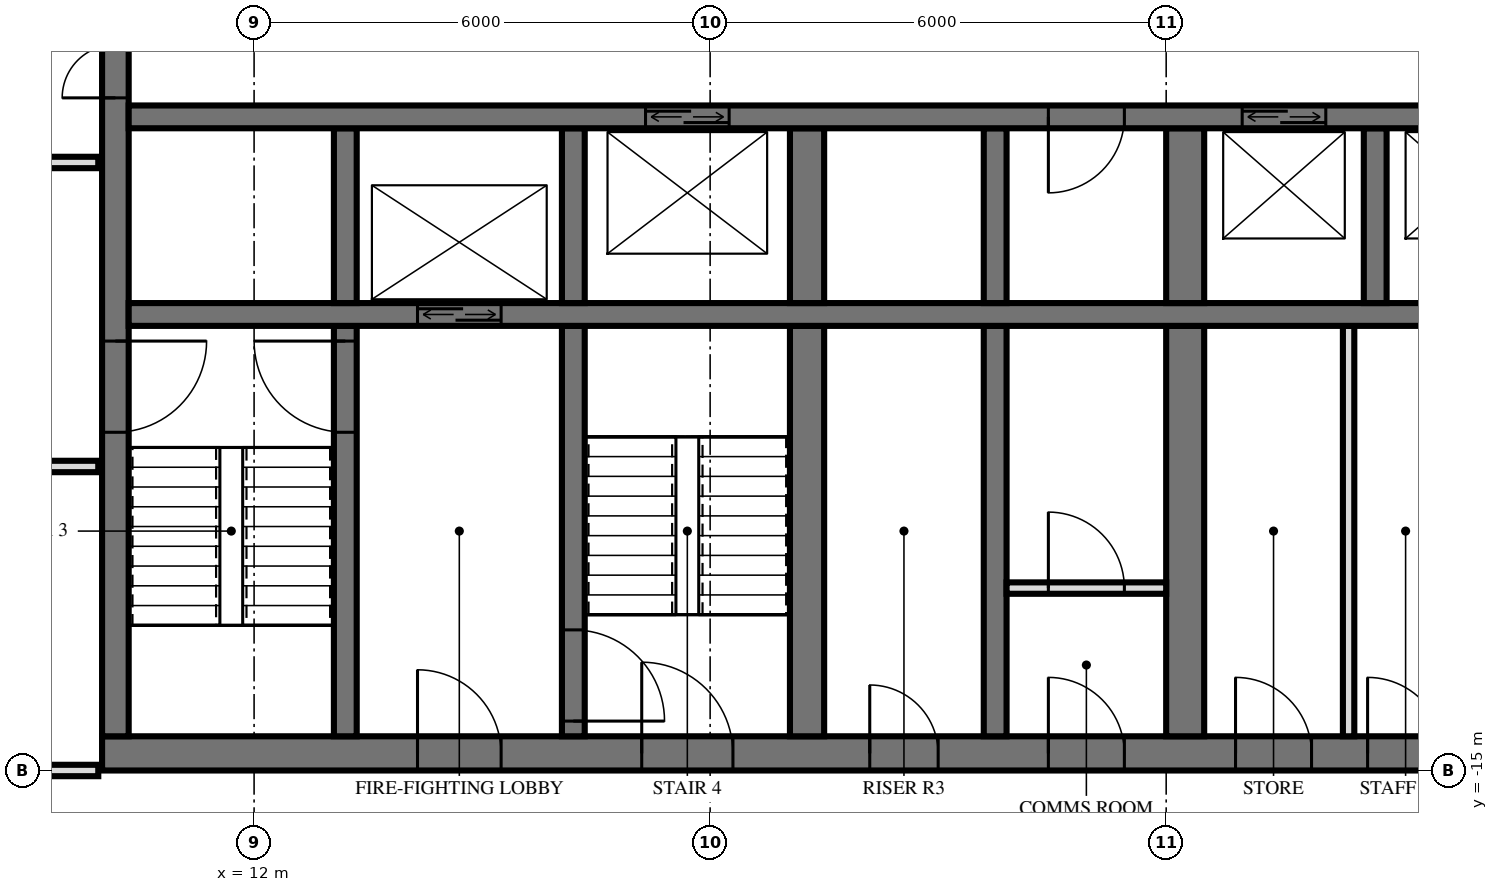
"""IFC4 building model, lengths in metres.
Left out: names, types, materials, properties, quantities, classifications, styles, units other than length and angle.
Written with IfcOpenShell. Run it as: python <this file> out.ifc"""

import sys

from ifc_helpers import new_model, si_unit, direction, frame, frame_2d, origin, place, context, subcontext, project, spatial, rectangle, extrude, element, fill, save


model = new_model("IFC4")
c1 = context("Model", 3, precision=1e-05, world=origin(), true_north=direction((0.0, 1.0)))
c2 = subcontext(c1, "Body", "Model", "MODEL_VIEW")
j1 = project(units=[si_unit("LENGTHUNIT", "METRE"), si_unit("PLANEANGLEUNIT", "RADIAN")], contexts=[c1])
p1 = place(None, origin())
s1 = spatial("IfcSite", under=j1, at=p1, CompositionType="ELEMENT")
p2 = place(p1, origin())
s2 = spatial("IfcBuilding", under=s1, at=p2, CompositionType="ELEMENT")
p3 = place(p2, frame((0.0, 0.0, 92.4)))
s3 = spatial("IfcBuildingStorey", under=s2, at=p3, CompositionType="ELEMENT", Elevation=92.4)
p4 = place(p3, frame((10.0, -14.775, 0.0), z_axis=(0.0, 0.0, 1.0), x_axis=(1.0, 0.0, 0.0)))
e1 = element("IfcWall", 1, at=p4, inside=s3, PredefinedType="SHEAR", context=c2, shape_type="SweptSolid", body=[
    extrude(rectangle(XDim=19.5, YDim=0.45, at=frame_2d((9.75, 0.0))), origin(), (0.0, 0.0, 1.0), 3.6),
])
p5 = place(p4, frame((7.1, 0.0, 0.0)))
e2 = element("IfcOpeningElement", 2, at=p5, cuts=e1, PredefinedType="OPENING", context=c2, shape_type="SweptSolid", body=[
    extrude(rectangle(XDim=1.2, YDim=2.1, at=frame_2d((0.6, 1.05))), frame((0.0, 0.235, 0.0), z_axis=(0.0, -1.0, 0.0), x_axis=(1.0, 0.0, 0.0)), (0.0, 0.0, 1.0), 0.47),
])
p6 = place(p4, frame((4.15, 0.0, 0.0)))
e3 = element("IfcOpeningElement", 3, at=p6, cuts=e1, PredefinedType="OPENING", context=c2, shape_type="SweptSolid", body=[
    extrude(rectangle(XDim=1.1, YDim=2.1, at=frame_2d((0.55, 1.05))), frame((0.0, 0.235, 0.0), z_axis=(0.0, -1.0, 0.0), x_axis=(1.0, 0.0, 0.0)), (0.0, 0.0, 1.0), 0.47),
])
p7 = place(p4, frame((10.1, 0.0, 0.0)))
e4 = element("IfcOpeningElement", 4, at=p7, cuts=e1, PredefinedType="OPENING", context=c2, shape_type="SweptSolid", body=[
    extrude(rectangle(XDim=0.9, YDim=2.1, at=frame_2d((0.45, 1.05))), frame((0.0, 0.235, 0.0), z_axis=(0.0, -1.0, 0.0), x_axis=(1.0, 0.0, 0.0)), (0.0, 0.0, 1.0), 0.47),
])
p8 = place(p4, frame((12.45, 0.0, 0.0)))
e5 = element("IfcOpeningElement", 5, at=p8, cuts=e1, PredefinedType="OPENING", context=c2, shape_type="SweptSolid", body=[
    extrude(rectangle(XDim=1.0, YDim=2.1, at=frame_2d((0.5, 1.05))), frame((0.0, 0.235, 0.0), z_axis=(0.0, -1.0, 0.0), x_axis=(1.0, 0.0, 0.0)), (0.0, 0.0, 1.0), 0.47),
])
p9 = place(p4, frame((14.913, 0.0, 0.0)))
e6 = element("IfcOpeningElement", 6, at=p9, cuts=e1, PredefinedType="OPENING", context=c2, shape_type="SweptSolid", body=[
    extrude(rectangle(XDim=1.0, YDim=2.1, at=frame_2d((0.5, 1.05))), frame((0.0, 0.235, 0.0), z_axis=(0.0, -1.0, 0.0), x_axis=(1.0, 0.0, 0.0)), (0.0, 0.0, 1.0), 0.47),
])
p10 = place(p4, frame((16.65, 0.0, 0.0)))
e7 = element("IfcOpeningElement", 7, at=p10, cuts=e1, PredefinedType="OPENING", context=c2, shape_type="SweptSolid", body=[
    extrude(rectangle(XDim=1.0, YDim=2.1, at=frame_2d((0.5, 1.05))), frame((0.0, 0.235, 0.0), z_axis=(0.0, -1.0, 0.0), x_axis=(1.0, 0.0, 0.0)), (0.0, 0.0, 1.0), 0.47),
])
p11 = place(p4, frame((18.025, 0.0, 0.0)))
e8 = element("IfcOpeningElement", 8, at=p11, cuts=e1, PredefinedType="OPENING", context=c2, shape_type="SweptSolid", body=[
    extrude(rectangle(XDim=1.0, YDim=2.1, at=frame_2d((0.5, 1.05))), frame((0.0, 0.235, 0.0), z_axis=(0.0, -1.0, 0.0), x_axis=(1.0, 0.0, 0.0)), (0.0, 0.0, 1.0), 0.47),
])
p12 = place(p3, frame((10.175, -14.55, 0.0), z_axis=(0.0, 0.0, 1.0), x_axis=(0.0, 1.0, 0.0)))
e9 = element("IfcWall", 9, at=p12, inside=s3, PredefinedType="SHEAR", context=c2, shape_type="SweptSolid", body=[
    extrude(rectangle(XDim=14.1, YDim=0.35, at=frame_2d((7.05, 0.0))), origin(), (0.0, 0.0, 1.0), 3.6),
])
p13 = place(p12, frame((8.4, 0.0, 0.0)))
e10 = element("IfcOpeningElement", 10, at=p13, cuts=e9, PredefinedType="OPENING", context=c2, shape_type="SweptSolid", body=[
    extrude(rectangle(XDim=1.4, YDim=2.4, at=frame_2d((0.7, 1.2))), frame((0.0, 0.185, 0.0), z_axis=(0.0, -1.0, 0.0), x_axis=(1.0, 0.0, 0.0)), (0.0, 0.0, 1.0), 0.37),
])
p14 = place(p12, frame((10.0, 0.0, 0.0)))
e11 = element("IfcOpeningElement", 11, at=p14, cuts=e9, PredefinedType="OPENING", context=c2, shape_type="SweptSolid", body=[
    extrude(rectangle(XDim=1.4, YDim=2.4, at=frame_2d((0.7, 1.2))), frame((0.0, 0.185, 0.0), z_axis=(0.0, -1.0, 0.0), x_axis=(1.0, 0.0, 0.0)), (0.0, 0.0, 1.0), 0.37),
])
p15 = place(p12, frame((4.0, 0.0, 0.0)))
e12 = element("IfcOpeningElement", 12, at=p15, cuts=e9, PredefinedType="OPENING", context=c2, shape_type="SweptSolid", body=[
    extrude(rectangle(XDim=1.2, YDim=2.1, at=frame_2d((0.6, 1.05))), frame((0.0, 0.185, 0.0), z_axis=(0.0, -1.0, 0.0), x_axis=(1.0, 0.0, 0.0)), (0.0, 0.0, 1.0), 0.37),
])
p16 = place(p3, frame((10.35, -6.4, 0.0), z_axis=(0.0, 0.0, 1.0), x_axis=(1.0, 0.0, 0.0)))
e13 = element("IfcWall", 13, at=p16, inside=s3, PredefinedType="SHEAR", context=c2, shape_type="SweptSolid", body=[
    extrude(rectangle(XDim=18.7, YDim=0.3, at=frame_2d((9.35, 0.0))), origin(), (0.0, 0.0, 1.0), 3.6),
])
p17 = place(p16, frame((14.65, 0.0, 0.0)))
e14 = element("IfcOpeningElement", 14, at=p17, cuts=e13, PredefinedType="OPENING", context=c2, shape_type="SweptSolid", body=[
    extrude(rectangle(XDim=1.1, YDim=2.1, at=frame_2d((0.55, 1.05))), frame((0.0, 0.16, 0.0), z_axis=(0.0, -1.0, 0.0), x_axis=(1.0, 0.0, 0.0)), (0.0, 0.0, 1.0), 0.32),
])
p18 = place(p16, frame((17.05, 0.0, 0.0)))
e15 = element("IfcOpeningElement", 15, at=p18, cuts=e13, PredefinedType="OPENING", context=c2, shape_type="SweptSolid", body=[
    extrude(rectangle(XDim=1.1, YDim=2.1, at=frame_2d((0.55, 1.05))), frame((0.0, 0.16, 0.0), z_axis=(0.0, -1.0, 0.0), x_axis=(1.0, 0.0, 0.0)), (0.0, 0.0, 1.0), 0.32),
])
p19 = place(p16, frame((6.8, 0.0, 0.0)))
e16 = element("IfcOpeningElement", 16, at=p19, cuts=e13, PredefinedType="OPENING", context=c2, shape_type="SweptSolid", body=[
    extrude(rectangle(XDim=1.1, YDim=2.1, at=frame_2d((0.55, 1.05))), frame((0.0, 0.16, 0.0), z_axis=(0.0, -1.0, 0.0), x_axis=(1.0, 0.0, 0.0)), (0.0, 0.0, 1.0), 0.32),
])
p20 = place(p16, frame((12.1, 0.0, 0.0)))
e17 = element("IfcOpeningElement", 17, at=p20, cuts=e13, PredefinedType="OPENING", context=c2, shape_type="SweptSolid", body=[
    extrude(rectangle(XDim=1.0, YDim=2.1, at=frame_2d((0.5, 1.05))), frame((0.0, 0.16, 0.0), z_axis=(0.0, -1.0, 0.0), x_axis=(1.0, 0.0, 0.0)), (0.0, 0.0, 1.0), 0.32),
])
p21 = place(p3, frame((10.35, -9.0, 0.0), z_axis=(0.0, 0.0, 1.0), x_axis=(1.0, 0.0, 0.0)))
e18 = element("IfcWall", 18, at=p21, inside=s3, PredefinedType="SHEAR", context=c2, shape_type="SweptSolid", body=[
    extrude(rectangle(XDim=18.7, YDim=0.3, at=frame_2d((9.35, 0.0))), origin(), (0.0, 0.0, 1.0), 3.6),
])
p22 = place(p21, frame((3.8, 0.0, 0.0)))
e19 = element("IfcOpeningElement", 19, at=p22, cuts=e18, PredefinedType="OPENING", context=c2, shape_type="SweptSolid", body=[
    extrude(rectangle(XDim=1.1, YDim=2.1, at=frame_2d((0.55, 1.05))), frame((0.0, 0.16, 0.0), z_axis=(0.0, -1.0, 0.0), x_axis=(1.0, 0.0, 0.0)), (0.0, 0.0, 1.0), 0.32),
])
p23 = place(p3, frame((13.2, -8.85, 0.0), z_axis=(0.0, 0.0, 1.0), x_axis=(0.0, 1.0, 0.0)))
e20 = element("IfcWall", 20, at=p23, inside=s3, PredefinedType="SHEAR", context=c2, shape_type="SweptSolid", body=[
    extrude(rectangle(XDim=2.3, YDim=0.3, at=frame_2d((1.15, 0.0))), origin(), (0.0, 0.0, 1.0), 3.6),
])
p24 = place(p3, frame((13.2, -14.55, 0.0), z_axis=(0.0, 0.0, 1.0), x_axis=(0.0, 1.0, 0.0)))
e21 = element("IfcWall", 21, at=p24, inside=s3, PredefinedType="SHEAR", context=c2, shape_type="SweptSolid", body=[
    extrude(rectangle(XDim=5.4, YDim=0.3, at=frame_2d((2.7, 0.0))), origin(), (0.0, 0.0, 1.0), 3.6),
])
p25 = place(p24, frame((4.0, 0.0, 0.0)))
e22 = element("IfcOpeningElement", 22, at=p25, cuts=e21, PredefinedType="OPENING", context=c2, shape_type="SweptSolid", body=[
    extrude(rectangle(XDim=1.2, YDim=2.1, at=frame_2d((0.6, 1.05))), frame((0.0, 0.16, 0.0), z_axis=(0.0, -1.0, 0.0), x_axis=(1.0, 0.0, 0.0)), (0.0, 0.0, 1.0), 0.32),
])
p26 = place(p3, frame((16.2, -8.85, 0.0), z_axis=(0.0, 0.0, 1.0), x_axis=(0.0, 1.0, 0.0)))
e23 = element("IfcWall", 23, at=p26, inside=s3, PredefinedType="SHEAR", context=c2, shape_type="SweptSolid", body=[
    extrude(rectangle(XDim=2.3, YDim=0.3, at=frame_2d((1.15, 0.0))), origin(), (0.0, 0.0, 1.0), 3.6),
])
p27 = place(p3, frame((16.2, -14.55, 0.0), z_axis=(0.0, 0.0, 1.0), x_axis=(0.0, 1.0, 0.0)))
e24 = element("IfcWall", 24, at=p27, inside=s3, PredefinedType="SHEAR", context=c2, shape_type="SweptSolid", body=[
    extrude(rectangle(XDim=5.4, YDim=0.3, at=frame_2d((2.7, 0.0))), origin(), (0.0, 0.0, 1.0), 3.6),
])
p28 = place(p27, frame((0.2, 0.0, 0.0)))
e25 = element("IfcOpeningElement", 25, at=p28, cuts=e24, PredefinedType="OPENING", context=c2, shape_type="SweptSolid", body=[
    extrude(rectangle(XDim=1.2, YDim=2.1, at=frame_2d((0.6, 1.05))), frame((0.0, 0.16, 0.0), z_axis=(0.0, -1.0, 0.0), x_axis=(1.0, 0.0, 0.0)), (0.0, 0.0, 1.0), 0.32),
])
p29 = place(p3, frame((19.275, -8.85, 0.0), z_axis=(0.0, 0.0, 1.0), x_axis=(0.0, 1.0, 0.0)))
e26 = element("IfcWall", 26, at=p29, inside=s3, PredefinedType="SHEAR", context=c2, shape_type="SweptSolid", body=[
    extrude(rectangle(XDim=2.3, YDim=0.45, at=frame_2d((1.15, 0.0))), origin(), (0.0, 0.0, 1.0), 3.6),
])
p30 = place(p3, frame((19.275, -14.55, 0.0), z_axis=(0.0, 0.0, 1.0), x_axis=(0.0, 1.0, 0.0)))
e27 = element("IfcWall", 27, at=p30, inside=s3, PredefinedType="SHEAR", context=c2, shape_type="SweptSolid", body=[
    extrude(rectangle(XDim=5.4, YDim=0.45, at=frame_2d((2.7, 0.0))), origin(), (0.0, 0.0, 1.0), 3.6),
])
p31 = place(p3, frame((21.75, -8.85, 0.0), z_axis=(0.0, 0.0, 1.0), x_axis=(0.0, 1.0, 0.0)))
e28 = element("IfcWall", 28, at=p31, inside=s3, PredefinedType="SHEAR", context=c2, shape_type="SweptSolid", body=[
    extrude(rectangle(XDim=2.3, YDim=0.3, at=frame_2d((1.15, 0.0))), origin(), (0.0, 0.0, 1.0), 3.6),
])
p32 = place(p3, frame((21.75, -14.55, 0.0), z_axis=(0.0, 0.0, 1.0), x_axis=(0.0, 1.0, 0.0)))
e29 = element("IfcWall", 29, at=p32, inside=s3, PredefinedType="SHEAR", context=c2, shape_type="SweptSolid", body=[
    extrude(rectangle(XDim=5.4, YDim=0.3, at=frame_2d((2.7, 0.0))), origin(), (0.0, 0.0, 1.0), 3.6),
])
p33 = place(p3, frame((24.25, -8.85, 0.0), z_axis=(0.0, 0.0, 1.0), x_axis=(0.0, 1.0, 0.0)))
e30 = element("IfcWall", 30, at=p33, inside=s3, PredefinedType="SHEAR", context=c2, shape_type="SweptSolid", body=[
    extrude(rectangle(XDim=2.3, YDim=0.5, at=frame_2d((1.15, 0.0))), origin(), (0.0, 0.0, 1.0), 3.6),
])
p34 = place(p3, frame((24.25, -14.55, 0.0), z_axis=(0.0, 0.0, 1.0), x_axis=(0.0, 1.0, 0.0)))
e31 = element("IfcWall", 31, at=p34, inside=s3, PredefinedType="SHEAR", context=c2, shape_type="SweptSolid", body=[
    extrude(rectangle(XDim=5.4, YDim=0.5, at=frame_2d((2.7, 0.0))), origin(), (0.0, 0.0, 1.0), 3.6),
])
p35 = place(p3, frame((26.75, -8.85, 0.0), z_axis=(0.0, 0.0, 1.0), x_axis=(0.0, 1.0, 0.0)))
e32 = element("IfcWall", 32, at=p35, inside=s3, PredefinedType="SHEAR", context=c2, shape_type="SweptSolid", body=[
    extrude(rectangle(XDim=2.3, YDim=0.3, at=frame_2d((1.15, 0.0))), origin(), (0.0, 0.0, 1.0), 3.6),
])
p36 = place(p3, frame((21.9, -12.6, 0.0), z_axis=(0.0, 0.0, 1.0), x_axis=(1.0, 0.0, 0.0)))
e33 = element("IfcWall", 33, at=p36, inside=s3, PredefinedType="PARTITIONING", context=c2, shape_type="SweptSolid", body=[
    extrude(rectangle(XDim=2.1, YDim=0.15, at=frame_2d((1.05, 0.0))), origin(), (0.0, 0.0, 1.0), 3.3),
])
p37 = place(p36, frame((0.55, 0.0, 0.0)))
e34 = element("IfcOpeningElement", 34, at=p37, cuts=e33, PredefinedType="OPENING", context=c2, shape_type="SweptSolid", body=[
    extrude(rectangle(XDim=1.0, YDim=2.1, at=frame_2d((0.5, 1.05))), frame((0.0, 0.085, 0.0), z_axis=(0.0, -1.0, 0.0), x_axis=(1.0, 0.0, 0.0)), (0.0, 0.0, 1.0), 0.17),
])
p38 = place(p3, frame((26.4, -14.55, 0.0), z_axis=(0.0, 0.0, 1.0), x_axis=(0.0, 1.0, 0.0)))
e35 = element("IfcWall", 35, at=p38, inside=s3, PredefinedType="PARTITIONING", context=c2, shape_type="SweptSolid", body=[
    extrude(rectangle(XDim=5.4, YDim=0.15, at=frame_2d((2.7, 0.0))), origin(), (0.0, 0.0, 1.0), 3.3),
])
p39 = place(p3, frame((-9.95, -15.0, 0.0), z_axis=(0.0, 0.0, 1.0), x_axis=(1.0, 0.0, 0.0)))
e36 = element("IfcWall", 36, at=p39, inside=s3, PredefinedType="PARTITIONING", context=c2, shape_type="SweptSolid", body=[
    extrude(rectangle(XDim=19.9, YDim=0.15, at=frame_2d((9.95, 0.0))), origin(), (0.0, 0.0, 1.0), 2.684),
])
p40 = place(p39, frame((9.45, 0.0, 0.0)))
e37 = element("IfcOpeningElement", 37, at=p40, cuts=e36, PredefinedType="OPENING", context=c2, shape_type="SweptSolid", body=[
    extrude(rectangle(XDim=1.0, YDim=2.1, at=frame_2d((0.5, 1.05))), frame((0.0, 0.085, 0.0), z_axis=(0.0, -1.0, 0.0), x_axis=(1.0, 0.0, 0.0)), (0.0, 0.0, 1.0), 0.17),
])
p41 = place(p3, frame((-9.95, -11.0, 0.0), z_axis=(0.0, 0.0, 1.0), x_axis=(1.0, 0.0, 0.0)))
e38 = element("IfcWall", 38, at=p41, inside=s3, PredefinedType="PARTITIONING", context=c2, shape_type="SweptSolid", body=[
    extrude(rectangle(XDim=19.9, YDim=0.15, at=frame_2d((9.95, 0.0))), origin(), (0.0, 0.0, 1.0), 3.32),
])
p42 = place(p41, frame((9.45, 0.0, 0.0)))
e39 = element("IfcOpeningElement", 39, at=p42, cuts=e38, PredefinedType="OPENING", context=c2, shape_type="SweptSolid", body=[
    extrude(rectangle(XDim=1.0, YDim=2.1, at=frame_2d((0.5, 1.05))), frame((0.0, 0.085, 0.0), z_axis=(0.0, -1.0, 0.0), x_axis=(1.0, 0.0, 0.0)), (0.0, 0.0, 1.0), 0.17),
])
p43 = place(p41, frame((15.45, 0.0, 0.0)))
e40 = element("IfcOpeningElement", 40, at=p43, cuts=e38, PredefinedType="OPENING", context=c2, shape_type="SweptSolid", body=[
    extrude(rectangle(XDim=1.0, YDim=2.1, at=frame_2d((0.5, 1.05))), frame((0.0, 0.085, 0.0), z_axis=(0.0, -1.0, 0.0), x_axis=(1.0, 0.0, 0.0)), (0.0, 0.0, 1.0), 0.17),
])
p44 = place(p3, frame((-9.95, -7.0, 0.0), z_axis=(0.0, 0.0, 1.0), x_axis=(1.0, 0.0, 0.0)))
e41 = element("IfcWall", 41, at=p44, inside=s3, PredefinedType="PARTITIONING", context=c2, shape_type="SweptSolid", body=[
    extrude(rectangle(XDim=19.9, YDim=0.15, at=frame_2d((9.95, 0.0))), origin(), (0.0, 0.0, 1.0), 3.32),
])
p45 = place(p44, frame((9.45, 0.0, 0.0)))
e42 = element("IfcOpeningElement", 42, at=p45, cuts=e41, PredefinedType="OPENING", context=c2, shape_type="SweptSolid", body=[
    extrude(rectangle(XDim=1.0, YDim=2.1, at=frame_2d((0.5, 1.05))), frame((0.0, 0.085, 0.0), z_axis=(0.0, -1.0, 0.0), x_axis=(1.0, 0.0, 0.0)), (0.0, 0.0, 1.0), 0.17),
])
p46 = place(p44, frame((3.45, 0.0, 0.0)))
e43 = element("IfcOpeningElement", 43, at=p46, cuts=e41, PredefinedType="OPENING", context=c2, shape_type="SweptSolid", body=[
    extrude(rectangle(XDim=1.0, YDim=2.1, at=frame_2d((0.5, 1.05))), frame((0.0, 0.085, 0.0), z_axis=(0.0, -1.0, 0.0), x_axis=(1.0, 0.0, 0.0)), (0.0, 0.0, 1.0), 0.17),
])
p47 = place(p17, origin())
e44 = element("IfcDoor", 44, at=p47, inside=s3, OperationType="DOUBLE_DOOR_SLIDING", PredefinedType="USERDEFINED", context=c2, shape_type="SweptSolid", body=[
    extrude(rectangle(XDim=1.1, YDim=2.1, at=frame_2d((0.55, 1.05))), frame((0.0, 0.025, 0.0), z_axis=(0.0, -1.0, 0.0), x_axis=(1.0, 0.0, 0.0)), (0.0, 0.0, 1.0), 0.05),
])
fill(e14, e44)
p48 = place(p22, origin())
e45 = element("IfcDoor", 45, at=p48, inside=s3, OperationType="DOUBLE_DOOR_SLIDING", PredefinedType="USERDEFINED", context=c2, shape_type="SweptSolid", body=[
    extrude(rectangle(XDim=1.1, YDim=2.1, at=frame_2d((0.55, 1.05))), frame((0.0, 0.025, 0.0), z_axis=(0.0, -1.0, 0.0), x_axis=(1.0, 0.0, 0.0)), (0.0, 0.0, 1.0), 0.05),
])
fill(e19, e45)
p49 = place(p19, origin())
e46 = element("IfcDoor", 46, at=p49, inside=s3, OperationType="DOUBLE_DOOR_SLIDING", PredefinedType="USERDEFINED", context=c2, shape_type="SweptSolid", body=[
    extrude(rectangle(XDim=1.1, YDim=2.1, at=frame_2d((0.55, 1.05))), frame((0.0, 0.025, 0.0), z_axis=(0.0, -1.0, 0.0), x_axis=(1.0, 0.0, 0.0)), (0.0, 0.0, 1.0), 0.05),
])
fill(e16, e46)
p50 = place(p13, origin())
e47 = element("IfcDoor", 47, at=p50, inside=s3, OperationType="DOUBLE_DOOR_SINGLE_SWING", PredefinedType="DOOR", context=c2, shape_type="SweptSolid", body=[
    extrude(rectangle(XDim=1.4, YDim=2.4, at=frame_2d((0.7, 1.2))), frame((0.0, 0.025, 0.0), z_axis=(0.0, -1.0, 0.0), x_axis=(1.0, 0.0, 0.0)), (0.0, 0.0, 1.0), 0.05),
])
fill(e10, e47)
p51 = place(p15, frame((0.6, 0.0, 0.0), z_axis=(0.0, 0.0, 1.0), x_axis=(-1.0, 0.0, 0.0)))
e48 = element("IfcDoor", 48, at=p51, inside=s3, OperationType="SINGLE_SWING_RIGHT", PredefinedType="DOOR", context=c2, shape_type="SweptSolid", body=[
    extrude(rectangle(XDim=1.2, YDim=2.1, at=frame_2d((0.0, 1.05))), frame((0.0, -0.025, 0.0), z_axis=(0.0, 1.0, 0.0), x_axis=(-1.0, 0.0, 0.0)), (0.0, 0.0, 1.0), 0.05),
])
fill(e12, e48)
p52 = place(p5, origin())
e49 = element("IfcDoor", 49, at=p52, inside=s3, OperationType="SINGLE_SWING_RIGHT", PredefinedType="DOOR", context=c2, shape_type="SweptSolid", body=[
    extrude(rectangle(XDim=1.2, YDim=2.1, at=frame_2d((0.6, 1.05))), frame((0.0, 0.025, 0.0), z_axis=(0.0, -1.0, 0.0), x_axis=(1.0, 0.0, 0.0)), (0.0, 0.0, 1.0), 0.05),
])
fill(e2, e49)
p53 = place(p6, origin())
e50 = element("IfcDoor", 50, at=p53, inside=s3, OperationType="SINGLE_SWING_RIGHT", PredefinedType="DOOR", context=c2, shape_type="SweptSolid", body=[
    extrude(rectangle(XDim=1.1, YDim=2.1, at=frame_2d((0.55, 1.05))), frame((0.0, 0.025, 0.0), z_axis=(0.0, -1.0, 0.0), x_axis=(1.0, 0.0, 0.0)), (0.0, 0.0, 1.0), 0.05),
])
fill(e3, e50)
p54 = place(p7, origin())
e51 = element("IfcDoor", 51, at=p54, inside=s3, OperationType="SINGLE_SWING_RIGHT", PredefinedType="DOOR", context=c2, shape_type="SweptSolid", body=[
    extrude(rectangle(XDim=0.9, YDim=2.1, at=frame_2d((0.45, 1.05))), frame((0.0, 0.025, 0.0), z_axis=(0.0, -1.0, 0.0), x_axis=(1.0, 0.0, 0.0)), (0.0, 0.0, 1.0), 0.05),
])
fill(e4, e51)
p55 = place(p8, origin())
e52 = element("IfcDoor", 52, at=p55, inside=s3, OperationType="SINGLE_SWING_RIGHT", PredefinedType="DOOR", context=c2, shape_type="SweptSolid", body=[
    extrude(rectangle(XDim=1.0, YDim=2.1, at=frame_2d((0.5, 1.05))), frame((0.0, 0.025, 0.0), z_axis=(0.0, -1.0, 0.0), x_axis=(1.0, 0.0, 0.0)), (0.0, 0.0, 1.0), 0.05),
])
fill(e5, e52)
p56 = place(p9, origin())
e53 = element("IfcDoor", 53, at=p56, inside=s3, OperationType="SINGLE_SWING_RIGHT", PredefinedType="DOOR", context=c2, shape_type="SweptSolid", body=[
    extrude(rectangle(XDim=1.0, YDim=2.1, at=frame_2d((0.5, 1.05))), frame((0.0, 0.025, 0.0), z_axis=(0.0, -1.0, 0.0), x_axis=(1.0, 0.0, 0.0)), (0.0, 0.0, 1.0), 0.05),
])
fill(e6, e53)
p57 = place(p10, origin())
e54 = element("IfcDoor", 54, at=p57, inside=s3, OperationType="SINGLE_SWING_RIGHT", PredefinedType="DOOR", context=c2, shape_type="SweptSolid", body=[
    extrude(rectangle(XDim=1.0, YDim=2.1, at=frame_2d((0.5, 1.05))), frame((0.0, 0.025, 0.0), z_axis=(0.0, -1.0, 0.0), x_axis=(1.0, 0.0, 0.0)), (0.0, 0.0, 1.0), 0.05),
])
fill(e7, e54)
p58 = place(p20, frame((0.5, 0.0, 0.0), z_axis=(0.0, 0.0, 1.0), x_axis=(-1.0, 0.0, 0.0)))
e55 = element("IfcDoor", 55, at=p58, inside=s3, OperationType="SINGLE_SWING_LEFT", PredefinedType="DOOR", context=c2, shape_type="SweptSolid", body=[
    extrude(rectangle(XDim=1.0, YDim=2.1, at=frame_2d((0.0, 1.05))), frame((0.0, -0.025, 0.0), z_axis=(0.0, 1.0, 0.0), x_axis=(-1.0, 0.0, 0.0)), (0.0, 0.0, 1.0), 0.05),
])
fill(e17, e55)
p59 = place(p25, origin())
e56 = element("IfcDoor", 56, at=p59, inside=s3, OperationType="SINGLE_SWING_LEFT", PredefinedType="DOOR", context=c2, shape_type="SweptSolid", body=[
    extrude(rectangle(XDim=1.2, YDim=2.1, at=frame_2d((0.6, 1.05))), frame((0.0, 0.025, 0.0), z_axis=(0.0, -1.0, 0.0), x_axis=(1.0, 0.0, 0.0)), (0.0, 0.0, 1.0), 0.05),
])
fill(e22, e56)
p60 = place(p28, frame((0.6, 0.0, 0.0), z_axis=(0.0, 0.0, 1.0), x_axis=(-1.0, 0.0, 0.0)))
e57 = element("IfcDoor", 57, at=p60, inside=s3, OperationType="SINGLE_SWING_LEFT", PredefinedType="DOOR", context=c2, shape_type="SweptSolid", body=[
    extrude(rectangle(XDim=1.2, YDim=2.1, at=frame_2d((0.0, 1.05))), frame((0.0, -0.025, 0.0), z_axis=(0.0, 1.0, 0.0), x_axis=(-1.0, 0.0, 0.0)), (0.0, 0.0, 1.0), 0.05),
])
fill(e25, e57)
p61 = place(p37, origin())
e58 = element("IfcDoor", 58, at=p61, inside=s3, OperationType="SINGLE_SWING_RIGHT", PredefinedType="DOOR", context=c2, shape_type="SweptSolid", body=[
    extrude(rectangle(XDim=1.0, YDim=2.1, at=frame_2d((0.5, 1.05))), frame((0.0, 0.025, 0.0), z_axis=(0.0, -1.0, 0.0), x_axis=(1.0, 0.0, 0.0)), (0.0, 0.0, 1.0), 0.05),
])
fill(e34, e58)
save(model, sys.argv[1])
